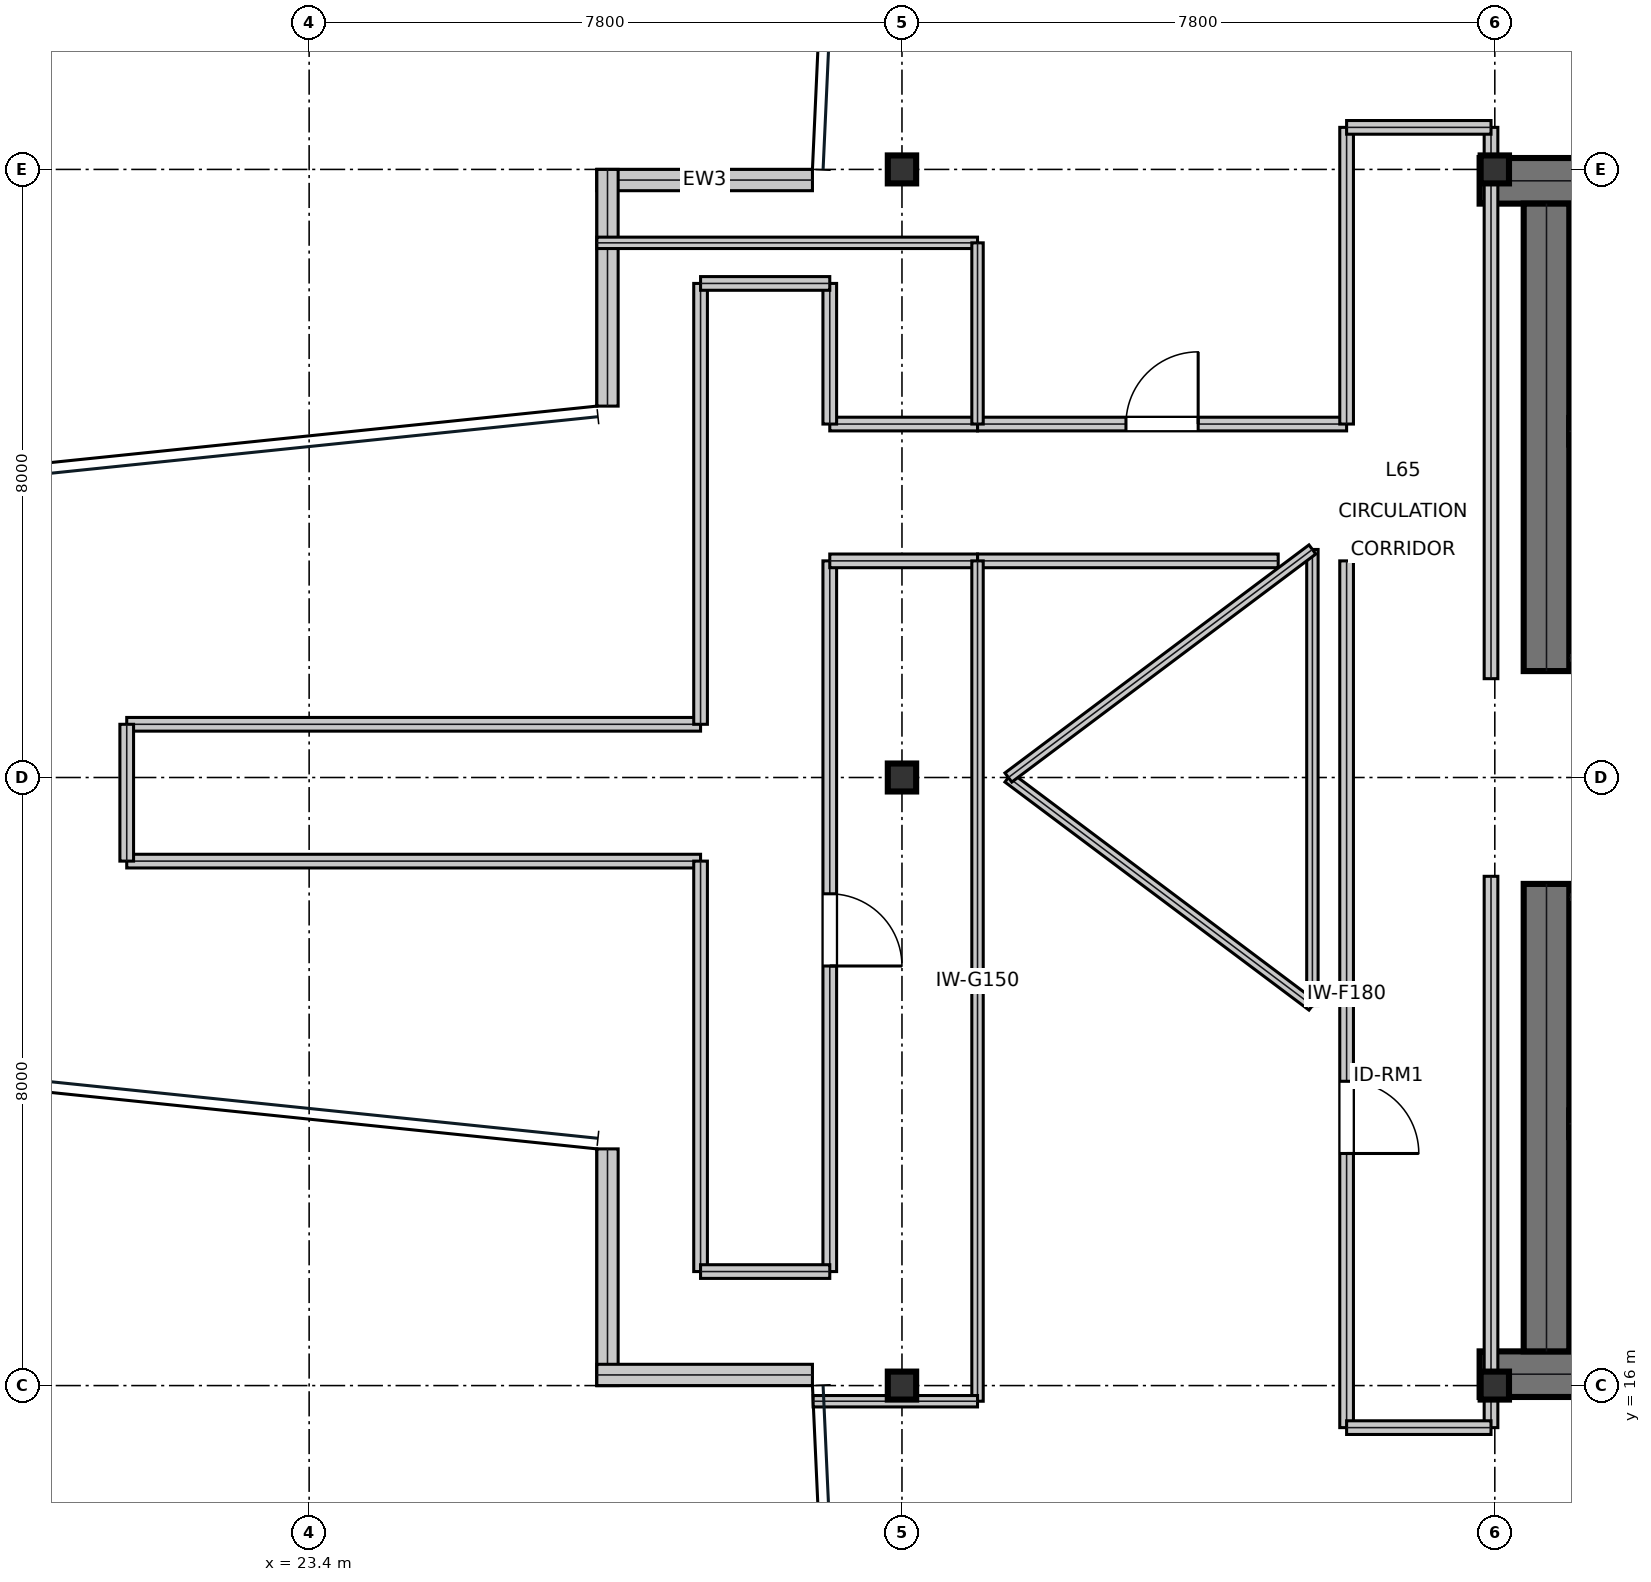
"""IFC4 building model, lengths in metres.
Left out: names, types, materials, properties, quantities, classifications, styles, units other than length and angle.
Written with IfcOpenShell. Run it as: python <this file> out.ifc"""

import sys

from ifc_helpers import new_model, si_unit, direction, frame, frame_2d, origin, origin_2d, place, context, subcontext, project, spatial, rectangle, i_section, extrude, element, fill, save


model = new_model("IFC4")
c1 = context("Model", 3, precision=1e-05, world=origin(), true_north=direction((0.0, 1.0)))
c2 = subcontext(c1, "Body", "Model", "MODEL_VIEW")
j1 = project(units=[si_unit("LENGTHUNIT", "METRE"), si_unit("PLANEANGLEUNIT", "RADIAN")], contexts=[c1])
p1 = place(None, origin())
s1 = spatial("IfcSite", under=j1, at=p1, CompositionType="ELEMENT")
p2 = place(p1, origin())
s2 = spatial("IfcBuilding", under=s1, at=p2, CompositionType="ELEMENT")
p3 = place(p2, frame((0.0, 0.0, 279.0)))
s3 = spatial("IfcBuildingStorey", under=s2, at=p3, CompositionType="ELEMENT", Elevation=279.0)
for number, where, z_axis, x_axis in (
    (1, (38.8, 31.85, 0.0), (0.0, 0.0, 1.0), (1.0, 0.0, 0.0)),
    (2, (38.8, 16.15, 0.0), (0.0, 0.0, 1.0), (1.0, 0.0, 0.0)),
):
    element("IfcWall", number, at=place(p3, frame(where, z_axis=z_axis, x_axis=x_axis)), inside=s3, PredefinedType="SHEAR", context=c2, shape_type="SweptSolid", body=[
        extrude(rectangle(XDim=16.0, YDim=0.6, at=frame_2d((8.0, 0.0))), origin(), (0.0, 0.0, 1.0), 3.81),
    ])
for number, where, z_axis, x_axis in (
    (3, (39.68, 16.45, 0.0), (0.0, 0.0, 1.0), (0.0, 1.0, 0.0)),
    (4, (39.68, 25.4, 0.0), (0.0, 0.0, 1.0), (0.0, 1.0, 0.0)),
):
    element("IfcWall", number, at=place(p3, frame(where, z_axis=z_axis, x_axis=x_axis)), inside=s3, PredefinedType="SHEAR", context=c2, shape_type="SweptSolid", body=[
        extrude(rectangle(XDim=6.15, YDim=0.6, at=frame_2d((3.075, 0.0))), origin(), (0.0, 0.0, 1.0), 3.81),
    ])
p4 = place(p3, frame((39.98, 28.555, 0.0), z_axis=(0.0, 0.0, 1.0), x_axis=(1.0, 0.0, 0.0)))
e5 = element("IfcWall", 5, at=p4, inside=s3, PredefinedType="SHEAR", context=c2, shape_type="SweptSolid", body=[
    extrude(rectangle(XDim=7.71, YDim=0.35, at=frame_2d((3.855, 0.0))), origin(), (0.0, 0.0, 1.0), 3.81),
])
p5 = place(p4, frame((0.25, 0.0, 0.0)))
e6 = element("IfcOpeningElement", 6, at=p5, cuts=e5, PredefinedType="OPENING", context=c2, shape_type="SweptSolid", body=[
    extrude(rectangle(XDim=1.1, YDim=2.15, at=frame_2d((0.55, 1.075))), frame((0.0, 0.185, 0.0), z_axis=(0.0, -1.0, 0.0), x_axis=(1.0, 0.0, 0.0)), (0.0, 0.0, 1.0), 0.37),
])
p6 = place(p3, frame((39.98, 19.445, 0.0), z_axis=(0.0, 0.0, 1.0), x_axis=(1.0, 0.0, 0.0)))
e7 = element("IfcWall", 7, at=p6, inside=s3, PredefinedType="SHEAR", context=c2, shape_type="SweptSolid", body=[
    extrude(rectangle(XDim=7.71, YDim=0.35, at=frame_2d((3.855, 0.0))), origin(), (0.0, 0.0, 1.0), 3.81),
])
p7 = place(p6, frame((0.25, 0.0, 0.0)))
e8 = element("IfcOpeningElement", 8, at=p7, cuts=e7, PredefinedType="OPENING", context=c2, shape_type="SweptSolid", body=[
    extrude(rectangle(XDim=1.1, YDim=2.15, at=frame_2d((0.55, 1.075))), frame((0.0, 0.185, 0.0), z_axis=(0.0, -1.0, 0.0), x_axis=(1.0, 0.0, 0.0)), (0.0, 0.0, 1.0), 0.37),
])
for number, where, z_axis, x_axis in (
    (9, (31.2, 16.0, 0.0), (0.0, 0.0, 1.0), (1.0, 0.0, 0.0)),
    (10, (31.2, 24.0, 0.0), (0.0, 0.0, 1.0), (1.0, 0.0, 0.0)),
    (11, (31.2, 32.0, 0.0), (0.0, 0.0, 1.0), (1.0, 0.0, 0.0)),
    (12, (39.0, 16.0, 0.0), (0.0, 0.0, 1.0), (1.0, 0.0, 0.0)),
    (13, (39.0, 32.0, 0.0), (0.0, 0.0, 1.0), (1.0, 0.0, 0.0)),
):
    element("IfcColumn", number, at=place(p3, frame(where, z_axis=z_axis, x_axis=x_axis)), inside=s3, PredefinedType="COLUMN", context=c2, shape_type="SweptSolid", body=[
        extrude(i_section(OverallWidth=0.373, OverallDepth=0.368, WebThickness=0.015, FlangeThickness=0.024, at=origin_2d()), origin(), (0.0, 0.0, 1.0), 4.044),
    ])
p8 = place(p3, frame((30.022, 31.86, 0.0), z_axis=(0.0, 0.0, 1.0), x_axis=(-1.0, 0.0, 0.0)))
e14 = element("IfcWall", 14, at=p8, inside=s3, PredefinedType="STANDARD", context=c2, shape_type="SweptSolid", body=[
    extrude(rectangle(XDim=2.836, YDim=0.28, at=frame_2d((1.418, 0.0))), origin(), (0.0, 0.0, 1.0), 3.81),
])
for number, where, z_axis, x_axis in (
    (15, (27.326, 32.0, 0.0), (0.0, 0.0, 1.0), (0.0, -1.0, 0.0)),
    (16, (27.326, 19.114, 0.0), (0.0, 0.0, 1.0), (0.0, -1.0, 0.0)),
):
    element("IfcWall", number, at=place(p3, frame(where, z_axis=z_axis, x_axis=x_axis)), inside=s3, PredefinedType="STANDARD", context=c2, shape_type="SweptSolid", body=[
        extrude(rectangle(XDim=3.114, YDim=0.28, at=frame_2d((1.557, 0.0))), origin(), (0.0, 0.0, 1.0), 3.339),
    ])
p9 = place(p3, frame((27.186, 16.14, 0.0), z_axis=(0.0, 0.0, 1.0), x_axis=(1.0, 0.0, 0.0)))
e17 = element("IfcWall", 17, at=p9, inside=s3, PredefinedType="STANDARD", context=c2, shape_type="SweptSolid", body=[
    extrude(rectangle(XDim=2.836, YDim=0.28, at=frame_2d((1.418, 0.0))), origin(), (0.0, 0.0, 1.0), 3.81),
])
p10 = place(p3, frame((39.98, 25.575, 0.0), z_axis=(0.0, 0.0, 1.0), x_axis=(1.0, 0.0, 0.0)))
e18 = element("IfcWall", 18, at=p10, inside=s3, PredefinedType="PARTITIONING", context=c2, shape_type="SweptSolid", body=[
    extrude(rectangle(XDim=5.9, YDim=0.15, at=frame_2d((2.95, 0.0))), origin(), (0.0, 0.0, 1.0), 3.81),
])
p11 = place(p10, frame((2.35, 0.0, 0.0)))
e19 = element("IfcOpeningElement", 19, at=p11, cuts=e18, PredefinedType="OPENING", context=c2, shape_type="SweptSolid", body=[
    extrude(rectangle(XDim=1.05, YDim=2.15, at=frame_2d((0.525, 1.075))), frame((0.0, 0.085, 0.0), z_axis=(0.0, -1.0, 0.0), x_axis=(1.0, 0.0, 0.0)), (0.0, 0.0, 1.0), 0.17),
])
p12 = place(p3, frame((39.98, 22.425, 0.0), z_axis=(0.0, 0.0, 1.0), x_axis=(1.0, 0.0, 0.0)))
e20 = element("IfcWall", 20, at=p12, inside=s3, PredefinedType="PARTITIONING", context=c2, shape_type="SweptSolid", body=[
    extrude(rectangle(XDim=5.9, YDim=0.15, at=frame_2d((2.95, 0.0))), origin(), (0.0, 0.0, 1.0), 3.81),
])
p13 = place(p12, frame((2.35, 0.0, 0.0)))
e21 = element("IfcOpeningElement", 21, at=p13, cuts=e20, PredefinedType="OPENING", context=c2, shape_type="SweptSolid", body=[
    extrude(rectangle(XDim=1.05, YDim=2.15, at=frame_2d((0.525, 1.075))), frame((0.0, 0.085, 0.0), z_axis=(0.0, -1.0, 0.0), x_axis=(1.0, 0.0, 0.0)), (0.0, 0.0, 1.0), 0.17),
])
p14 = place(p3, frame((37.05, 15.447, 0.0), z_axis=(0.0, 0.0, 1.0), x_axis=(0.0, 1.0, 0.0)))
e22 = element("IfcWall", 22, at=p14, inside=s3, PredefinedType="SOLIDWALL", context=c2, shape_type="SweptSolid", body=[
    extrude(rectangle(XDim=11.403, YDim=0.18, at=frame_2d((5.702, 0.0))), origin(), (0.0, 0.0, 1.0), 3.27),
])
p15 = place(p14, frame((3.607, 0.0, 0.0)))
e23 = element("IfcOpeningElement", 23, at=p15, cuts=e22, PredefinedType="OPENING", context=c2, shape_type="SweptSolid", body=[
    extrude(rectangle(XDim=0.95, YDim=2.15, at=frame_2d((0.475, 1.075))), frame((0.0, 0.1, 0.0), z_axis=(0.0, -1.0, 0.0), x_axis=(1.0, 0.0, 0.0)), (0.0, 0.0, 1.0), 0.2),
])
p16 = place(p3, frame((30.25, 17.5, 0.0), z_axis=(0.0, 0.0, 1.0), x_axis=(0.0, 1.0, 0.0)))
e24 = element("IfcWall", 24, at=p16, inside=s3, PredefinedType="SOLIDWALL", context=c2, shape_type="SweptSolid", body=[
    extrude(rectangle(XDim=9.35, YDim=0.18, at=frame_2d((4.675, 0.0))), origin(), (0.0, 0.0, 1.0), 3.27),
])
p17 = place(p16, frame((4.02, 0.0, 0.0)))
e25 = element("IfcOpeningElement", 25, at=p17, cuts=e24, PredefinedType="OPENING", context=c2, shape_type="SweptSolid", body=[
    extrude(rectangle(XDim=0.95, YDim=2.15, at=frame_2d((0.475, 1.075))), frame((0.0, 0.1, 0.0), z_axis=(0.0, -1.0, 0.0), x_axis=(1.0, 0.0, 0.0)), (0.0, 0.0, 1.0), 0.2),
])
p18 = place(p3, frame((32.194, 28.65, 0.0), z_axis=(0.0, 0.0, 1.0), x_axis=(1.0, 0.0, 0.0)))
e26 = element("IfcWall", 26, at=p18, inside=s3, PredefinedType="SOLIDWALL", context=c2, shape_type="SweptSolid", body=[
    extrude(rectangle(XDim=4.856, YDim=0.18, at=frame_2d((2.428, 0.0))), origin(), (0.0, 0.0, 1.0), 3.81),
])
p19 = place(p18, frame((1.953, 0.0, 0.0)))
e27 = element("IfcOpeningElement", 27, at=p19, cuts=e26, PredefinedType="OPENING", context=c2, shape_type="SweptSolid", body=[
    extrude(rectangle(XDim=0.95, YDim=2.15, at=frame_2d((0.475, 1.075))), frame((0.0, 0.1, 0.0), z_axis=(0.0, -1.0, 0.0), x_axis=(1.0, 0.0, 0.0)), (0.0, 0.0, 1.0), 0.2),
])
p20 = place(p3, frame((38.95, 15.447, 0.0), z_axis=(0.0, 0.0, 1.0), x_axis=(0.0, 1.0, 0.0)))
e28 = element("IfcWall", 28, at=p20, inside=s3, PredefinedType="SOLIDWALL", context=c2, shape_type="SweptSolid", body=[
    extrude(rectangle(XDim=7.253, YDim=0.18, at=frame_2d((3.626, 0.0))), origin(), (0.0, 0.0, 1.0), 3.27),
])
p21 = place(p3, frame((32.194, 26.85, 0.0), z_axis=(0.0, 0.0, 1.0), x_axis=(1.0, 0.0, 0.0)))
e29 = element("IfcWall", 29, at=p21, inside=s3, PredefinedType="SOLIDWALL", context=c2, shape_type="SweptSolid", body=[
    extrude(rectangle(XDim=3.956, YDim=0.18, at=frame_2d((1.978, 0.0))), origin(), (0.0, 0.0, 1.0), 3.81),
])
p22 = place(p3, frame((37.05, 15.447, 0.0), z_axis=(0.0, 0.0, 1.0), x_axis=(1.0, 0.0, 0.0)))
e30 = element("IfcWall", 30, at=p22, inside=s3, PredefinedType="SOLIDWALL", context=c2, shape_type="SweptSolid", body=[
    extrude(rectangle(XDim=1.9, YDim=0.18, at=frame_2d((0.95, 0.0))), origin(), (0.0, 0.0, 1.0), 3.27),
])
for number, where, z_axis, x_axis in (
    (31, (21.0, 22.9, 0.0), (0.0, 0.0, 1.0), (1.0, 0.0, 0.0)),
    (32, (21.0, 24.7, 0.0), (0.0, 0.0, 1.0), (1.0, 0.0, 0.0)),
):
    element("IfcWall", number, at=place(p3, frame(where, z_axis=z_axis, x_axis=x_axis)), inside=s3, PredefinedType="SOLIDWALL", context=c2, shape_type="SweptSolid", body=[
        extrude(rectangle(XDim=7.55, YDim=0.18, at=frame_2d((3.775, 0.0))), origin(), (0.0, 0.0, 1.0), 3.27),
    ])
p23 = place(p3, frame((28.55, 24.7, 0.0), z_axis=(0.0, 0.0, 1.0), x_axis=(0.0, 1.0, 0.0)))
e33 = element("IfcWall", 33, at=p23, inside=s3, PredefinedType="SOLIDWALL", context=c2, shape_type="SweptSolid", body=[
    extrude(rectangle(XDim=5.8, YDim=0.18, at=frame_2d((2.9, 0.0))), origin(), (0.0, 0.0, 1.0), 3.81),
])
p24 = place(p3, frame((28.55, 17.5, 0.0), z_axis=(0.0, 0.0, 1.0), x_axis=(0.0, 1.0, 0.0)))
e34 = element("IfcWall", 34, at=p24, inside=s3, PredefinedType="SOLIDWALL", context=c2, shape_type="SweptSolid", body=[
    extrude(rectangle(XDim=5.4, YDim=0.18, at=frame_2d((2.7, 0.0))), origin(), (0.0, 0.0, 1.0), 3.81),
])
for number, where, z_axis, x_axis in (
    (35, (30.25, 26.85, 0.0), (0.0, 0.0, 1.0), (1.0, 0.0, 0.0)),
    (36, (30.25, 28.65, 0.0), (0.0, 0.0, 1.0), (1.0, 0.0, 0.0)),
):
    element("IfcWall", number, at=place(p3, frame(where, z_axis=z_axis, x_axis=x_axis)), inside=s3, PredefinedType="SOLIDWALL", context=c2, shape_type="SweptSolid", body=[
        extrude(rectangle(XDim=1.944, YDim=0.18, at=frame_2d((0.972, 0.0))), origin(), (0.0, 0.0, 1.0), 3.27),
    ])
p25 = place(p3, frame((30.25, 28.65, 0.0), z_axis=(0.0, 0.0, 1.0), x_axis=(0.0, 1.0, 0.0)))
e37 = element("IfcWall", 37, at=p25, inside=s3, PredefinedType="SOLIDWALL", context=c2, shape_type="SweptSolid", body=[
    extrude(rectangle(XDim=1.85, YDim=0.18, at=frame_2d((0.925, 0.0))), origin(), (0.0, 0.0, 1.0), 3.81),
])
p26 = place(p3, frame((21.0, 22.9, 0.0), z_axis=(0.0, 0.0, 1.0), x_axis=(0.0, 1.0, 0.0)))
e38 = element("IfcWall", 38, at=p26, inside=s3, PredefinedType="SOLIDWALL", context=c2, shape_type="SweptSolid", body=[
    extrude(rectangle(XDim=1.8, YDim=0.18, at=frame_2d((0.9, 0.0))), origin(), (0.0, 0.0, 1.0), 3.81),
])
for number, where, z_axis, x_axis in (
    (39, (28.55, 17.5, 0.0), (0.0, 0.0, 1.0), (1.0, 0.0, 0.0)),
    (40, (28.55, 30.5, 0.0), (0.0, 0.0, 1.0), (1.0, 0.0, 0.0)),
):
    element("IfcWall", number, at=place(p3, frame(where, z_axis=z_axis, x_axis=x_axis)), inside=s3, PredefinedType="SOLIDWALL", context=c2, shape_type="SweptSolid", body=[
        extrude(rectangle(XDim=1.7, YDim=0.18, at=frame_2d((0.85, 0.0))), origin(), (0.0, 0.0, 1.0), 3.81),
    ])
p27 = place(p3, frame((38.95, 25.3, 0.0), z_axis=(0.0, 0.0, 1.0), x_axis=(0.0, 1.0, 0.0)))
e41 = element("IfcWall", 41, at=p27, inside=s3, PredefinedType="SOLIDWALL", context=c2, shape_type="SweptSolid", body=[
    extrude(rectangle(XDim=7.253, YDim=0.18, at=frame_2d((3.626, 0.0))), origin(), (0.0, 0.0, 1.0), 3.27),
])
p28 = place(p3, frame((37.05, 28.65, 0.0), z_axis=(0.0, 0.0, 1.0), x_axis=(0.0, 1.0, 0.0)))
e42 = element("IfcWall", 42, at=p28, inside=s3, PredefinedType="SOLIDWALL", context=c2, shape_type="SweptSolid", body=[
    extrude(rectangle(XDim=3.903, YDim=0.18, at=frame_2d((1.952, 0.0))), origin(), (0.0, 0.0, 1.0), 3.27),
])
p29 = place(p3, frame((37.05, 32.553, 0.0), z_axis=(0.0, 0.0, 1.0), x_axis=(1.0, 0.0, 0.0)))
e43 = element("IfcWall", 43, at=p29, inside=s3, PredefinedType="SOLIDWALL", context=c2, shape_type="SweptSolid", body=[
    extrude(rectangle(XDim=1.9, YDim=0.18, at=frame_2d((0.95, 0.0))), origin(), (0.0, 0.0, 1.0), 3.27),
])
p30 = place(p3, frame((32.194, 15.794, 0.0), z_axis=(0.0, 0.0, 1.0), x_axis=(0.0, 1.0, 0.0)))
e44 = element("IfcWall", 44, at=p30, inside=s3, PredefinedType="MOVABLE", context=c2, shape_type="SweptSolid", body=[
    extrude(rectangle(XDim=11.056, YDim=0.15, at=frame_2d((5.528, 0.0))), origin(), (0.0, 0.0, 1.0), 3.27),
])
p31 = place(p3, frame((30.031, 15.794, 0.0), z_axis=(0.0, 0.0, 1.0), x_axis=(1.0, 0.0, 0.0)))
e45 = element("IfcWall", 45, at=p31, inside=s3, PredefinedType="MOVABLE", context=c2, shape_type="SweptSolid", body=[
    extrude(rectangle(XDim=2.163, YDim=0.15, at=frame_2d((1.081, 0.0))), origin(), (0.0, 0.0, 1.0), 3.27),
])
p32 = place(p3, frame((27.186, 31.034, 0.0), z_axis=(0.0, 0.0, 1.0), x_axis=(1.0, 0.0, 0.0)))
e46 = element("IfcWall", 46, at=p32, inside=s3, PredefinedType="MOVABLE", context=c2, shape_type="SweptSolid", body=[
    extrude(rectangle(XDim=5.009, YDim=0.15, at=frame_2d((2.504, 0.0))), origin(), (0.0, 0.0, 1.0), 3.27),
])
p33 = place(p3, frame((32.194, 28.65, 0.0), z_axis=(0.0, 0.0, 1.0), x_axis=(0.0, 1.0, 0.0)))
e47 = element("IfcWall", 47, at=p33, inside=s3, PredefinedType="MOVABLE", context=c2, shape_type="SweptSolid", body=[
    extrude(rectangle(XDim=2.384, YDim=0.15, at=frame_2d((1.192, 0.0))), origin(), (0.0, 0.0, 1.0), 3.54),
])
p34 = place(p3, frame((32.6, 24.0, 0.0), z_axis=(0.0, 0.0, 1.0), x_axis=(0.8, -0.6, 0.0)))
e48 = element("IfcWall", 48, at=p34, inside=s3, PredefinedType="MOVABLE", context=c2, shape_type="SweptSolid", body=[
    extrude(rectangle(XDim=5.0, YDim=0.15, at=frame_2d((2.5, 0.0))), origin(), (0.0, 0.0, 1.0), 3.81),
])
p35 = place(p3, frame((36.6, 21.0, 0.0), z_axis=(0.0, 0.0, 1.0), x_axis=(0.0, 1.0, 0.0)))
e49 = element("IfcWall", 49, at=p35, inside=s3, PredefinedType="MOVABLE", context=c2, shape_type="SweptSolid", body=[
    extrude(rectangle(XDim=6.0, YDim=0.15, at=frame_2d((3.0, 0.0))), origin(), (0.0, 0.0, 1.0), 3.81),
])
p36 = place(p3, frame((36.6, 27.0, 0.0), z_axis=(0.0, 0.0, 1.0), x_axis=(-0.8, -0.6, 0.0)))
e50 = element("IfcWall", 50, at=p36, inside=s3, PredefinedType="MOVABLE", context=c2, shape_type="SweptSolid", body=[
    extrude(rectangle(XDim=5.0, YDim=0.15, at=frame_2d((2.5, 0.0))), origin(), (0.0, 0.0, 1.0), 3.81),
])
p37 = place(p15, frame((0.95, 0.0, 0.0), z_axis=(0.0, 0.0, 1.0), x_axis=(-1.0, 0.0, 0.0)))
e51 = element("IfcDoor", 51, at=p37, inside=s3, OperationType="SINGLE_SWING_RIGHT", PredefinedType="DOOR", context=c2, shape_type="SweptSolid", body=[
    extrude(rectangle(XDim=0.95, YDim=2.15, at=frame_2d((0.475, 1.075))), frame((0.0, 0.025, 0.0), z_axis=(0.0, -1.0, 0.0), x_axis=(1.0, 0.0, 0.0)), (0.0, 0.0, 1.0), 0.05),
])
fill(e23, e51)
p38 = place(p17, frame((0.95, 0.0, 0.0), z_axis=(0.0, 0.0, 1.0), x_axis=(-1.0, 0.0, 0.0)))
e52 = element("IfcDoor", 52, at=p38, inside=s3, OperationType="SINGLE_SWING_RIGHT", PredefinedType="DOOR", context=c2, shape_type="SweptSolid", body=[
    extrude(rectangle(XDim=0.95, YDim=2.15, at=frame_2d((0.475, 1.075))), frame((0.0, 0.025, 0.0), z_axis=(0.0, -1.0, 0.0), x_axis=(1.0, 0.0, 0.0)), (0.0, 0.0, 1.0), 0.05),
])
fill(e25, e52)
p39 = place(p19, origin())
e53 = element("IfcDoor", 53, at=p39, inside=s3, OperationType="SINGLE_SWING_RIGHT", PredefinedType="DOOR", context=c2, shape_type="SweptSolid", body=[
    extrude(rectangle(XDim=0.95, YDim=2.15, at=frame_2d((0.475, 1.075))), frame((0.0, 0.025, 0.0), z_axis=(0.0, -1.0, 0.0), x_axis=(1.0, 0.0, 0.0)), (0.0, 0.0, 1.0), 0.05),
])
fill(e27, e53)
save(model, sys.argv[1])
